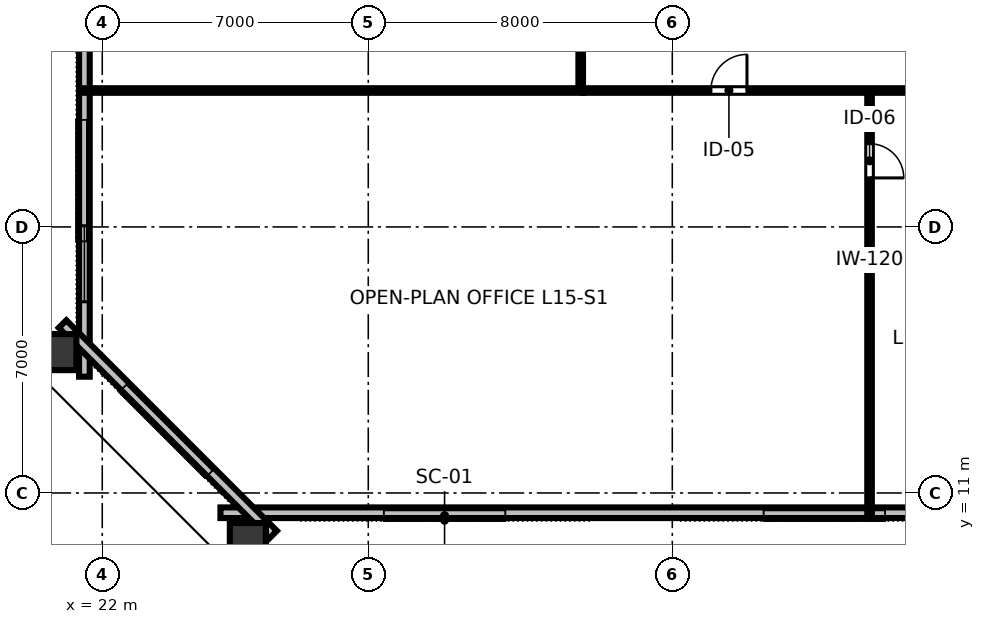
"""IFC4 building model, lengths in metres.
Left out: names, types, materials, properties, quantities, classifications, styles, units other than length and angle.
Written with IfcOpenShell. Run it as: python <this file> out.ifc"""

import sys

from ifc_helpers import new_model, si_unit, direction, frame, frame_2d, origin, origin_2d, place, context, subcontext, project, spatial, rectangle, hollow_rectangle, extrude, element, fill, save


model = new_model("IFC4")
c1 = context("Model", 3, precision=1e-05, world=origin(), true_north=direction((0.0, 1.0)))
c2 = subcontext(c1, "Body", "Model", "MODEL_VIEW")
j1 = project(units=[si_unit("LENGTHUNIT", "METRE"), si_unit("PLANEANGLEUNIT", "RADIAN")], contexts=[c1])
p1 = place(None, origin())
s1 = spatial("IfcSite", under=j1, at=p1, CompositionType="ELEMENT")
p2 = place(p1, origin())
s2 = spatial("IfcBuilding", under=s1, at=p2, CompositionType="ELEMENT")
p3 = place(p2, frame((0.0, 0.0, 60.4)))
s3 = spatial("IfcBuildingStorey", under=s2, at=p3, CompositionType="ELEMENT", Elevation=60.4)
for number, where, z_axis, x_axis in (
    (1, (25.832, 9.635, 0.0), (0.0, 0.0, 1.0), (1.0, 0.0, 0.0)),
    (2, (20.744, 14.707, 0.0), (0.0, 0.0, 1.0), (0.0, 1.0, 0.0)),
):
    element("IfcColumn", number, at=place(p3, frame(where, z_axis=z_axis, x_axis=x_axis)), inside=s3, PredefinedType="COLUMN", context=c2, shape_type="SweptSolid", body=[
        extrude(hollow_rectangle(XDim=0.95, YDim=1.15, WallThickness=0.06, at=origin_2d()), origin(), (0.0, 0.0, 1.0), 3.358),
    ])
p4 = place(p3, frame((25.11, 10.48, 0.0), z_axis=(0.0, 0.0, 1.0), x_axis=(1.0, 0.0, 0.0)))
e3 = element("IfcWall", 3, at=p4, inside=s3, PredefinedType="STANDARD", context=c2, shape_type="SweptSolid", body=[
    extrude(rectangle(XDim=41.78, YDim=0.28, at=frame_2d((20.89, 0.0))), origin(), (0.0, 0.0, 1.0), 3.36),
])
p5 = place(p3, frame((21.53, 49.94, 0.0), z_axis=(0.0, 0.0, 1.0), x_axis=(0.0, -1.0, 0.0)))
e4 = element("IfcWall", 4, at=p5, inside=s3, PredefinedType="STANDARD", context=c2, shape_type="SweptSolid", body=[
    extrude(rectangle(XDim=35.88, YDim=0.28, at=frame_2d((17.94, 0.0))), origin(), (0.0, 0.0, 1.0), 3.36),
])
p6 = place(p5, frame((14.57, 0.0, 0.0)))
e5 = element("IfcOpeningElement", 5, at=p6, cuts=e4, PredefinedType="OPENING", context=c2, shape_type="SweptSolid", body=[
    extrude(rectangle(XDim=1.4, YDim=2.15, at=frame_2d((0.7, 1.075))), frame((0.0, 0.15, 0.0), z_axis=(0.0, -1.0, 0.0), x_axis=(1.0, 0.0, 0.0)), (0.0, 0.0, 1.0), 0.3),
])
p7 = place(p5, frame((1.971, 0.0, 0.8)))
e6 = element("IfcOpeningElement", 6, at=p7, cuts=e4, PredefinedType="OPENING", context=c2, shape_type="SweptSolid", body=[
    extrude(rectangle(XDim=2.0, YDim=1.95, at=frame_2d((1.0, 0.975))), frame((0.0, 0.15, 0.0), z_axis=(0.0, -1.0, 0.0), x_axis=(1.0, 0.0, 0.0)), (0.0, 0.0, 1.0), 0.3),
])
p8 = place(p5, frame((9.456, 0.0, 0.8)))
e7 = element("IfcOpeningElement", 7, at=p8, cuts=e4, PredefinedType="OPENING", context=c2, shape_type="SweptSolid", body=[
    extrude(rectangle(XDim=2.0, YDim=1.95, at=frame_2d((1.0, 0.975))), frame((0.0, 0.15, 0.0), z_axis=(0.0, -1.0, 0.0), x_axis=(1.0, 0.0, 0.0)), (0.0, 0.0, 1.0), 0.3),
])
p9 = place(p5, frame((20.682, 0.0, 0.8)))
e8 = element("IfcOpeningElement", 8, at=p9, cuts=e4, PredefinedType="OPENING", context=c2, shape_type="SweptSolid", body=[
    extrude(rectangle(XDim=2.0, YDim=1.95, at=frame_2d((1.0, 0.975))), frame((0.0, 0.15, 0.0), z_axis=(0.0, -1.0, 0.0), x_axis=(1.0, 0.0, 0.0)), (0.0, 0.0, 1.0), 0.3),
])
p10 = place(p5, frame((24.424, 0.0, 0.8)))
e9 = element("IfcOpeningElement", 9, at=p10, cuts=e4, PredefinedType="OPENING", context=c2, shape_type="SweptSolid", body=[
    extrude(rectangle(XDim=2.0, YDim=1.95, at=frame_2d((1.0, 0.975))), frame((0.0, 0.15, 0.0), z_axis=(0.0, -1.0, 0.0), x_axis=(1.0, 0.0, 0.0)), (0.0, 0.0, 1.0), 0.3),
])
p11 = place(p5, frame((31.909, 0.0, 0.8)))
e10 = element("IfcOpeningElement", 10, at=p11, cuts=e4, PredefinedType="OPENING", context=c2, shape_type="SweptSolid", body=[
    extrude(rectangle(XDim=2.0, YDim=1.95, at=frame_2d((1.0, 0.975))), frame((0.0, 0.15, 0.0), z_axis=(0.0, -1.0, 0.0), x_axis=(1.0, 0.0, 0.0)), (0.0, 0.0, 1.0), 0.3),
])
p12 = place(p3, frame((20.956, 15.446, 0.0), z_axis=(0.0, 0.0, 1.0), x_axis=(0.707106781187, -0.707106781187, 0.0)))
e11 = element("IfcWall", 11, at=p12, inside=s3, PredefinedType="STANDARD", context=c2, shape_type="SweptSolid", body=[
    extrude(rectangle(XDim=7.834, YDim=0.28, at=frame_2d((3.917, 0.0))), origin(), (0.0, 0.0, 1.0), 3.36),
])
p13 = place(p3, frame((42.191, 21.59, 0.0), z_axis=(0.0, 0.0, 1.0), x_axis=(0.0, -1.0, 0.0)))
e12 = element("IfcWall", 12, at=p13, inside=s3, PredefinedType="PARTITIONING", context=c2, shape_type="SweptSolid", body=[
    extrude(rectangle(XDim=11.11, YDim=0.12, at=frame_2d((5.555, 0.0))), origin(), (0.0, 0.0, 1.0), 2.64),
])
p14 = place(p13, frame((1.4, 0.0, 0.0)))
e13 = element("IfcOpeningElement", 13, at=p14, cuts=e12, PredefinedType="OPENING", context=c2, shape_type="SweptSolid", body=[
    extrude(rectangle(XDim=0.9, YDim=2.15, at=frame_2d((0.45, 1.075))), frame((0.0, 0.07, 0.0), z_axis=(0.0, -1.0, 0.0), x_axis=(1.0, 0.0, 0.0)), (0.0, 0.0, 1.0), 0.14),
])
p15 = place(p3, frame((34.65, 21.59, 0.0), z_axis=(0.0, 0.0, 1.0), x_axis=(1.0, 0.0, 0.0)))
e14 = element("IfcWall", 14, at=p15, inside=s3, PredefinedType="PARTITIONING", context=c2, shape_type="SweptSolid", body=[
    extrude(rectangle(XDim=22.7, YDim=0.12, at=frame_2d((11.35, 0.0))), origin(), (0.0, 0.0, 1.0), 2.64),
])
p16 = place(p15, frame((3.365, 0.0, 0.0)))
e15 = element("IfcOpeningElement", 15, at=p16, cuts=e14, PredefinedType="OPENING", context=c2, shape_type="SweptSolid", body=[
    extrude(rectangle(XDim=0.95, YDim=2.15, at=frame_2d((0.475, 1.075))), frame((0.0, 0.07, 0.0), z_axis=(0.0, -1.0, 0.0), x_axis=(1.0, 0.0, 0.0)), (0.0, 0.0, 1.0), 0.14),
])
p17 = place(p15, frame((8.718, 0.0, 0.0)))
e16 = element("IfcOpeningElement", 16, at=p17, cuts=e14, PredefinedType="OPENING", context=c2, shape_type="SweptSolid", body=[
    extrude(rectangle(XDim=0.95, YDim=2.15, at=frame_2d((0.475, 1.075))), frame((0.0, 0.07, 0.0), z_axis=(0.0, -1.0, 0.0), x_axis=(1.0, 0.0, 0.0)), (0.0, 0.0, 1.0), 0.14),
])
p18 = place(p15, frame((13.651, 0.0, 0.0)))
e17 = element("IfcOpeningElement", 17, at=p18, cuts=e14, PredefinedType="OPENING", context=c2, shape_type="SweptSolid", body=[
    extrude(rectangle(XDim=0.95, YDim=2.15, at=frame_2d((0.475, 1.075))), frame((0.0, 0.07, 0.0), z_axis=(0.0, -1.0, 0.0), x_axis=(1.0, 0.0, 0.0)), (0.0, 0.0, 1.0), 0.14),
])
p19 = place(p15, frame((19.509, 0.0, 0.0)))
e18 = element("IfcOpeningElement", 18, at=p19, cuts=e14, PredefinedType="OPENING", context=c2, shape_type="SweptSolid", body=[
    extrude(rectangle(XDim=0.95, YDim=2.15, at=frame_2d((0.475, 1.075))), frame((0.0, 0.07, 0.0), z_axis=(0.0, -1.0, 0.0), x_axis=(1.0, 0.0, 0.0)), (0.0, 0.0, 1.0), 0.14),
])
p20 = place(p3, frame((34.59, 21.65, 0.0), z_axis=(0.0, 0.0, 1.0), x_axis=(0.0, 1.0, 0.0)))
e19 = element("IfcWall", 19, at=p20, inside=s3, PredefinedType="PARTITIONING", context=c2, shape_type="SweptSolid", body=[
    extrude(rectangle(XDim=20.7, YDim=0.12, at=frame_2d((10.35, 0.0))), origin(), (0.0, 0.0, 1.0), 2.64),
])
p21 = place(p20, frame((6.696, 0.0, 0.0)))
e20 = element("IfcOpeningElement", 20, at=p21, cuts=e19, PredefinedType="OPENING", context=c2, shape_type="SweptSolid", body=[
    extrude(rectangle(XDim=0.95, YDim=2.15, at=frame_2d((0.475, 1.075))), frame((0.0, 0.07, 0.0), z_axis=(0.0, -1.0, 0.0), x_axis=(1.0, 0.0, 0.0)), (0.0, 0.0, 1.0), 0.14),
])
p22 = place(p20, frame((16.846, 0.0, 0.0)))
e21 = element("IfcOpeningElement", 21, at=p22, cuts=e19, PredefinedType="OPENING", context=c2, shape_type="SweptSolid", body=[
    extrude(rectangle(XDim=0.95, YDim=2.15, at=frame_2d((0.475, 1.075))), frame((0.0, 0.07, 0.0), z_axis=(0.0, -1.0, 0.0), x_axis=(1.0, 0.0, 0.0)), (0.0, 0.0, 1.0), 0.14),
])
p23 = place(p3, frame((34.65, 21.59, 0.0), z_axis=(0.0, 0.0, 1.0), x_axis=(-1.0, 0.0, 0.0)))
e22 = element("IfcWall", 22, at=p23, inside=s3, PredefinedType="PARTITIONING", context=c2, shape_type="SweptSolid", body=[
    extrude(rectangle(XDim=13.12, YDim=0.12, at=frame_2d((6.56, 0.0))), origin(), (0.0, 0.0, 1.0), 2.64),
])
p24 = place(p11, origin())
e23 = element("IfcWindow", 23, at=p24, inside=s3, PartitioningType="SINGLE_PANEL", PredefinedType="WINDOW", context=c2, shape_type="SweptSolid", body=[
    extrude(rectangle(XDim=2.0, YDim=1.95, at=frame_2d((1.0, 0.975))), frame((0.0, 0.03, 0.0), z_axis=(0.0, -1.0, 0.0), x_axis=(1.0, 0.0, 0.0)), (0.0, 0.0, 1.0), 0.06),
])
fill(e10, e23)
p25 = place(p14, origin())
e24 = element("IfcDoor", 24, at=p25, inside=s3, OperationType="SINGLE_SWING_RIGHT", PredefinedType="DOOR", context=c2, shape_type="SweptSolid", body=[
    extrude(rectangle(XDim=0.9, YDim=2.15, at=frame_2d((0.45, 1.075))), frame((0.0, 0.025, 0.0), z_axis=(0.0, -1.0, 0.0), x_axis=(1.0, 0.0, 0.0)), (0.0, 0.0, 1.0), 0.05),
])
fill(e13, e24)
p26 = place(p16, origin())
e25 = element("IfcDoor", 25, at=p26, inside=s3, OperationType="SINGLE_SWING_RIGHT", PredefinedType="DOOR", context=c2, shape_type="SweptSolid", body=[
    extrude(rectangle(XDim=0.95, YDim=2.15, at=frame_2d((0.475, 1.075))), frame((0.0, 0.025, 0.0), z_axis=(0.0, -1.0, 0.0), x_axis=(1.0, 0.0, 0.0)), (0.0, 0.0, 1.0), 0.05),
])
fill(e15, e25)
save(model, sys.argv[1])
